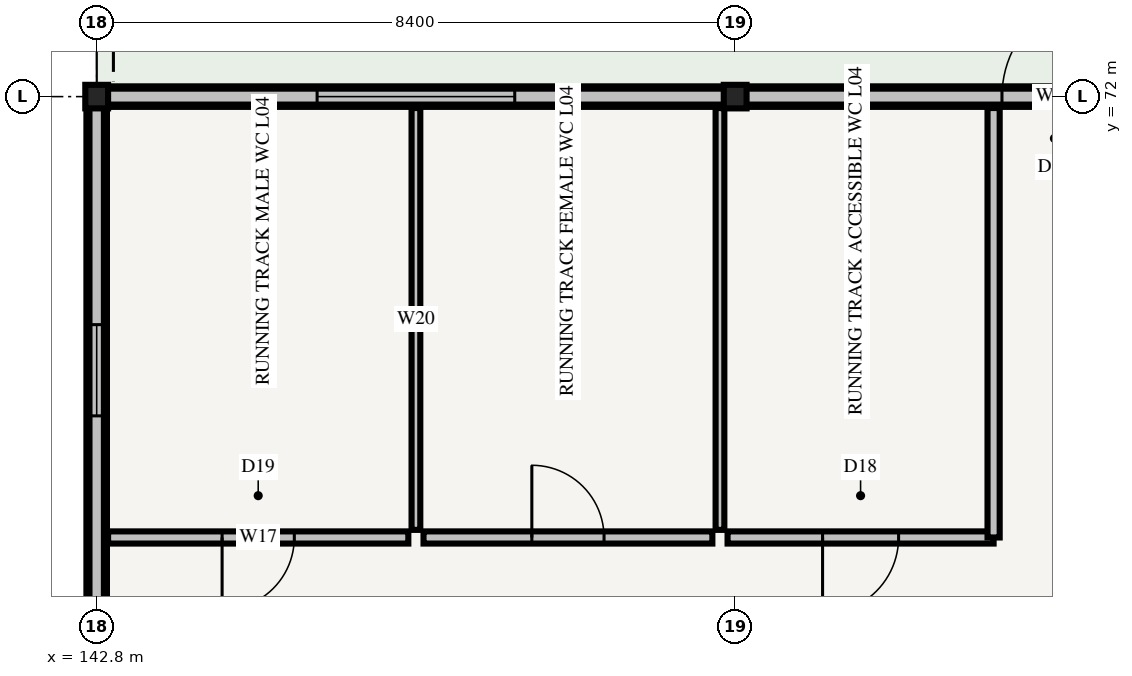
"""IFC4 building model, lengths in metres.
Left out: names, types, materials, properties, quantities, classifications, styles, units other than length and angle.
Written with IfcOpenShell. Run it as: python <this file> out.ifc"""

import sys

from ifc_helpers import new_model, si_unit, direction, frame, frame_2d, origin, origin_2d, place, context, subcontext, project, spatial, rectangle, i_section, extrude, element, fill, save


model = new_model("IFC4")
c1 = context("Model", 3, precision=1e-05, world=origin(), true_north=direction((0.0, 1.0)))
c2 = subcontext(c1, "Body", "Model", "MODEL_VIEW")
j1 = project(units=[si_unit("LENGTHUNIT", "METRE"), si_unit("PLANEANGLEUNIT", "RADIAN")], contexts=[c1])
p1 = place(None, origin())
s1 = spatial("IfcSite", under=j1, at=p1, CompositionType="ELEMENT")
p2 = place(p1, origin())
s2 = spatial("IfcBuilding", under=s1, at=p2, CompositionType="ELEMENT")
p3 = place(p2, frame((0.0, 0.0, 17.1)))
s3 = spatial("IfcBuildingStorey", under=s2, at=p3, CompositionType="ELEMENT", Elevation=17.1)
for number, where, z_axis, x_axis in (
    (1, (142.8, 72.0, 0.0), (0.0, 0.0, 1.0), (1.0, 0.0, 0.0)),
    (2, (151.2, 72.0, 0.0), (0.0, 0.0, 1.0), (1.0, 0.0, 0.0)),
):
    element("IfcColumn", number, at=place(p3, frame(where, z_axis=z_axis, x_axis=x_axis)), inside=s3, PredefinedType="COLUMN", context=c2, shape_type="SweptSolid", body=[
        extrude(i_section(OverallWidth=0.3, OverallDepth=0.31, WebThickness=0.009, FlangeThickness=0.015, FilletRadius=0.027, at=origin_2d()), origin(), (0.0, 0.0, 1.0), 4.2),
    ])
p4 = place(p3, frame((159.6, 72.0, 0.0), z_axis=(0.0, 0.0, 1.0), x_axis=(-1.0, 0.0, 0.0)))
e3 = element("IfcWall", 3, at=p4, inside=s3, PredefinedType="STANDARD", context=c2, shape_type="SweptSolid", body=[
    extrude(rectangle(XDim=8.4, YDim=0.27, at=frame_2d((4.2, 0.0))), origin(), (0.0, 0.0, 1.0), 3.495),
])
p5 = place(p4, frame((3.51, 0.0, 0.0)))
e4 = element("IfcOpeningElement", 4, at=p5, cuts=e3, PredefinedType="OPENING", context=c2, shape_type="SweptSolid", body=[
    extrude(rectangle(XDim=1.38, YDim=2.25, at=frame_2d((0.69, 1.125))), frame((0.0, 0.16, 0.0), z_axis=(0.0, -1.0, 0.0), x_axis=(1.0, 0.0, 0.0)), (0.0, 0.0, 1.0), 0.32),
])
p6 = place(p3, frame((151.2, 72.0, 0.0), z_axis=(0.0, 0.0, 1.0), x_axis=(-1.0, 0.0, 0.0)))
e5 = element("IfcWall", 5, at=p6, inside=s3, PredefinedType="STANDARD", context=c2, shape_type="SweptSolid", body=[
    extrude(rectangle(XDim=8.4, YDim=0.27, at=frame_2d((4.2, 0.0))), origin(), (0.0, 0.0, 1.0), 3.495),
])
p7 = place(p6, frame((2.9, 0.0, 0.85)))
e6 = element("IfcOpeningElement", 6, at=p7, cuts=e5, PredefinedType="OPENING", context=c2, shape_type="SweptSolid", body=[
    extrude(rectangle(XDim=2.6, YDim=2.0, at=frame_2d((1.3, 1.0))), frame((0.0, 0.16, 0.0), z_axis=(0.0, -1.0, 0.0), x_axis=(1.0, 0.0, 0.0)), (0.0, 0.0, 1.0), 0.32),
])
p8 = place(p3, frame((142.8, 72.0, 0.0), z_axis=(0.0, 0.0, 1.0), x_axis=(0.0, -1.0, 0.0)))
e7 = element("IfcWall", 7, at=p8, inside=s3, PredefinedType="STANDARD", context=c2, shape_type="SweptSolid", body=[
    extrude(rectangle(XDim=7.2, YDim=0.27, at=frame_2d((3.6, 0.0))), origin(), (0.0, 0.0, 1.0), 3.445),
])
p9 = place(p8, frame((3.0, 0.0, 0.85)))
e8 = element("IfcOpeningElement", 8, at=p9, cuts=e7, PredefinedType="OPENING", context=c2, shape_type="SweptSolid", body=[
    extrude(rectangle(XDim=1.2, YDim=1.8, at=frame_2d((0.6, 0.9))), frame((0.0, 0.16, 0.0), z_axis=(0.0, -1.0, 0.0), x_axis=(1.0, 0.0, 0.0)), (0.0, 0.0, 1.0), 0.32),
])
p10 = place(p3, frame((168.0, 72.0, 4.2), z_axis=(0.0, 0.0, 1.0), x_axis=(-1.0, 0.0, 0.0)))
e9 = element("IfcWall", 9, at=p10, inside=s3, PredefinedType="PARAPET", context=c2, shape_type="SweptSolid", body=[
    extrude(rectangle(XDim=25.2, YDim=0.21, at=frame_2d((12.6, 0.0))), origin(), (0.0, 0.0, 1.0), 0.65),
])
p11 = place(p3, frame((142.8, 72.0, 4.2), z_axis=(0.0, 0.0, 1.0), x_axis=(0.0, -1.0, 0.0)))
e10 = element("IfcWall", 10, at=p11, inside=s3, PredefinedType="PARAPET", context=c2, shape_type="SweptSolid", body=[
    extrude(rectangle(XDim=43.2, YDim=0.19, at=frame_2d((21.6, 0.0))), origin(), (0.0, 0.0, 1.0), 0.65),
])
p12 = place(p3, frame((142.95, 66.2, 0.0), z_axis=(0.0, 0.0, 1.0), x_axis=(1.0, 0.0, 0.0)))
e11 = element("IfcWall", 11, at=p12, inside=s3, PredefinedType="PARTITIONING", context=c2, shape_type="SweptSolid", body=[
    extrude(rectangle(XDim=3.95, YDim=0.16, at=frame_2d((1.975, 0.0))), origin(), (0.0, 0.0, 1.0), 3.32),
])
p13 = place(p12, frame((1.5, 0.0, 0.0)))
e12 = element("IfcOpeningElement", 12, at=p13, cuts=e11, PredefinedType="OPENING", context=c2, shape_type="SweptSolid", body=[
    extrude(rectangle(XDim=0.95, YDim=2.15, at=frame_2d((0.475, 1.075))), frame((0.0, 0.105, 0.0), z_axis=(0.0, -1.0, 0.0), x_axis=(1.0, 0.0, 0.0)), (0.0, 0.0, 1.0), 0.21),
])
p14 = place(p3, frame((147.1, 66.2, 0.0), z_axis=(0.0, 0.0, 1.0), x_axis=(1.0, 0.0, 0.0)))
e13 = element("IfcWall", 13, at=p14, inside=s3, PredefinedType="PARTITIONING", context=c2, shape_type="SweptSolid", body=[
    extrude(rectangle(XDim=3.8, YDim=0.16, at=frame_2d((1.9, 0.0))), origin(), (0.0, 0.0, 1.0), 3.32),
])
p15 = place(p14, frame((1.425, 0.0, 0.0)))
e14 = element("IfcOpeningElement", 14, at=p15, cuts=e13, PredefinedType="OPENING", context=c2, shape_type="SweptSolid", body=[
    extrude(rectangle(XDim=0.95, YDim=2.15, at=frame_2d((0.475, 1.075))), frame((0.0, 0.105, 0.0), z_axis=(0.0, -1.0, 0.0), x_axis=(1.0, 0.0, 0.0)), (0.0, 0.0, 1.0), 0.21),
])
p16 = place(p3, frame((151.1, 66.2, 0.0), z_axis=(0.0, 0.0, 1.0), x_axis=(1.0, 0.0, 0.0)))
e15 = element("IfcWall", 15, at=p16, inside=s3, PredefinedType="PARTITIONING", context=c2, shape_type="SweptSolid", body=[
    extrude(rectangle(XDim=3.5, YDim=0.16, at=frame_2d((1.75, 0.0))), origin(), (0.0, 0.0, 1.0), 3.32),
])
p17 = place(p16, frame((1.25, 0.0, 0.0)))
e16 = element("IfcOpeningElement", 16, at=p17, cuts=e15, PredefinedType="OPENING", context=c2, shape_type="SweptSolid", body=[
    extrude(rectangle(XDim=1.0, YDim=2.15, at=frame_2d((0.5, 1.075))), frame((0.0, 0.105, 0.0), z_axis=(0.0, -1.0, 0.0), x_axis=(1.0, 0.0, 0.0)), (0.0, 0.0, 1.0), 0.21),
])
for number, where, z_axis, x_axis in (
    (17, (147.0, 66.3, 0.0), (0.0, 0.0, 1.0), (0.0, 1.0, 0.0)),
    (18, (151.0, 66.3, 0.0), (0.0, 0.0, 1.0), (0.0, 1.0, 0.0)),
):
    element("IfcWall", number, at=place(p3, frame(where, z_axis=z_axis, x_axis=x_axis)), inside=s3, PredefinedType="PARTITIONING", context=c2, shape_type="SweptSolid", body=[
        extrude(rectangle(XDim=5.55, YDim=0.115, at=frame_2d((2.775, 0.0))), origin(), (0.0, 0.0, 1.0), 3.32),
    ])
p18 = place(p3, frame((154.6, 66.2, 0.0), z_axis=(0.0, 0.0, 1.0), x_axis=(0.0, 1.0, 0.0)))
e19 = element("IfcWall", 19, at=p18, inside=s3, PredefinedType="PARTITIONING", context=c2, shape_type="SweptSolid", body=[
    extrude(rectangle(XDim=5.65, YDim=0.16, at=frame_2d((2.825, 0.0))), origin(), (0.0, 0.0, 1.0), 3.32),
])
p19 = place(p5, frame((1.38, 0.0, 0.0), z_axis=(0.0, 0.0, 1.0), x_axis=(-1.0, 0.0, 0.0)))
e20 = element("IfcDoor", 20, at=p19, inside=s3, OperationType="SINGLE_SWING_RIGHT", PredefinedType="DOOR", context=c2, shape_type="SweptSolid", body=[
    extrude(rectangle(XDim=1.38, YDim=2.25, at=frame_2d((0.69, 1.125))), frame((0.0, 0.025, 0.0), z_axis=(0.0, -1.0, 0.0), x_axis=(1.0, 0.0, 0.0)), (0.0, 0.0, 1.0), 0.05),
])
fill(e4, e20)
p20 = place(p7, origin())
e21 = element("IfcWindow", 21, at=p20, inside=s3, PartitioningType="SINGLE_PANEL", PredefinedType="WINDOW", context=c2, shape_type="SweptSolid", body=[
    extrude(rectangle(XDim=2.6, YDim=2.0, at=frame_2d((1.3, 1.0))), frame((0.0, 0.03, 0.0), z_axis=(0.0, -1.0, 0.0), x_axis=(1.0, 0.0, 0.0)), (0.0, 0.0, 1.0), 0.06),
])
fill(e6, e21)
p21 = place(p9, origin())
e22 = element("IfcWindow", 22, at=p21, inside=s3, PartitioningType="SINGLE_PANEL", PredefinedType="WINDOW", context=c2, shape_type="SweptSolid", body=[
    extrude(rectangle(XDim=1.2, YDim=1.8, at=frame_2d((0.6, 0.9))), frame((0.0, 0.03, 0.0), z_axis=(0.0, -1.0, 0.0), x_axis=(1.0, 0.0, 0.0)), (0.0, 0.0, 1.0), 0.06),
])
fill(e8, e22)
p22 = place(p13, frame((0.95, 0.0, 0.0), z_axis=(0.0, 0.0, 1.0), x_axis=(-1.0, 0.0, 0.0)))
e23 = element("IfcDoor", 23, at=p22, inside=s3, OperationType="SINGLE_SWING_RIGHT", PredefinedType="DOOR", context=c2, shape_type="SweptSolid", body=[
    extrude(rectangle(XDim=0.95, YDim=2.15, at=frame_2d((0.475, 1.075))), frame((0.0, 0.025, 0.0), z_axis=(0.0, -1.0, 0.0), x_axis=(1.0, 0.0, 0.0)), (0.0, 0.0, 1.0), 0.05),
])
fill(e12, e23)
p23 = place(p15, origin())
e24 = element("IfcDoor", 24, at=p23, inside=s3, OperationType="SINGLE_SWING_LEFT", PredefinedType="DOOR", context=c2, shape_type="SweptSolid", body=[
    extrude(rectangle(XDim=0.95, YDim=2.15, at=frame_2d((0.475, 1.075))), frame((0.0, 0.025, 0.0), z_axis=(0.0, -1.0, 0.0), x_axis=(1.0, 0.0, 0.0)), (0.0, 0.0, 1.0), 0.05),
])
fill(e14, e24)
p24 = place(p17, origin())
e25 = element("IfcDoor", 25, at=p24, inside=s3, OperationType="SINGLE_SWING_RIGHT", PredefinedType="DOOR", context=c2, shape_type="SweptSolid", body=[
    extrude(rectangle(XDim=1.0, YDim=2.15, at=frame_2d((0.5, 1.075))), frame((0.0, 0.025, 0.0), z_axis=(0.0, -1.0, 0.0), x_axis=(1.0, 0.0, 0.0)), (0.0, 0.0, 1.0), 0.05),
])
fill(e16, e25)
save(model, sys.argv[1])
